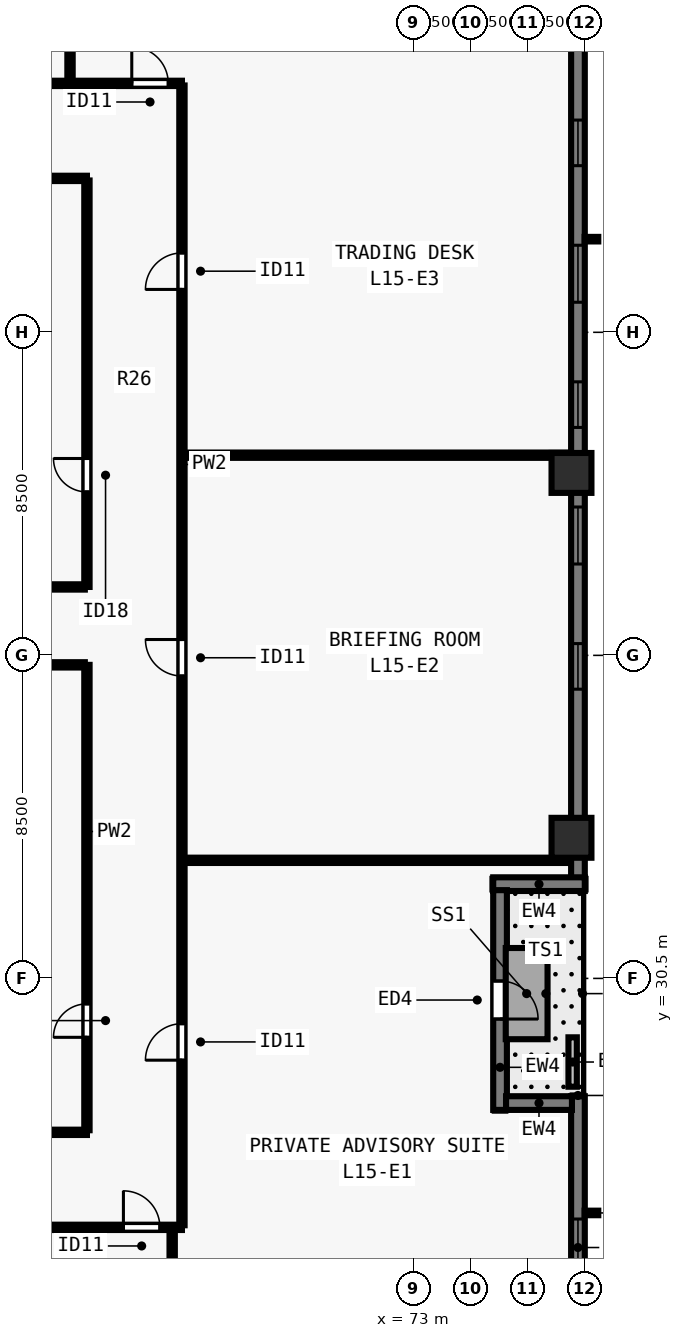
"""IFC4 building model, lengths in metres.
Left out: names, types, materials, properties, quantities, classifications, styles, units other than length and angle.
Written with IfcOpenShell. Run it as: python <this file> out.ifc"""

import sys

from ifc_helpers import new_model, si_unit, direction, frame, frame_2d, origin, origin_2d, place, context, subcontext, project, spatial, rectangle, extrude, element, fill, save


model = new_model("IFC4")
c1 = context("Model", 3, precision=1e-05, world=origin(), true_north=direction((0.0, 1.0)))
c2 = subcontext(c1, "Body", "Model", "MODEL_VIEW")
j1 = project(units=[si_unit("LENGTHUNIT", "METRE"), si_unit("PLANEANGLEUNIT", "RADIAN")], contexts=[c1])
p1 = place(None, origin())
s1 = spatial("IfcSite", under=j1, at=p1, CompositionType="ELEMENT")
p2 = place(p1, origin())
s2 = spatial("IfcBuilding", under=s1, at=p2, CompositionType="ELEMENT")
p3 = place(p2, frame((0.0, 0.0, 58.5)))
s3 = spatial("IfcBuildingStorey", under=s2, at=p3, CompositionType="ELEMENT", Elevation=58.5)
for number, where, z_axis, x_axis in (
    (1, (77.15, 34.2, 0.0), (0.0, 0.0, 1.0), (0.0, 1.0, 0.0)),
    (2, (77.15, 43.8, 0.0), (0.0, 0.0, 1.0), (0.0, 1.0, 0.0)),
):
    element("IfcColumn", number, at=place(p3, frame(where, z_axis=z_axis, x_axis=x_axis)), inside=s3, PredefinedType="COLUMN", context=c2, shape_type="SweptSolid", body=[
        extrude(rectangle(XDim=1.05, YDim=1.05, at=origin_2d()), origin(), (0.0, 0.0, 1.0), 3.5),
    ])
p4 = place(p3, frame((77.32, 27.4, 0.0), z_axis=(0.0, 0.0, 1.0), x_axis=(0.0, -1.0, 0.0)))
e3 = element("IfcWall", 3, at=p4, inside=s3, PredefinedType="SOLIDWALL", context=c2, shape_type="SweptSolid", body=[
    extrude(rectangle(XDim=10.562, YDim=0.36, at=frame_2d((5.281, 0.0))), origin(), (0.0, 0.0, 1.0), 3.28),
])
p5 = place(p4, frame((3.231, 0.0, 0.8)))
e4 = element("IfcOpeningElement", 4, at=p5, cuts=e3, PredefinedType="OPENING", context=c2, shape_type="SweptSolid", body=[
    extrude(rectangle(XDim=1.5, YDim=1.544, at=frame_2d((0.75, 0.772))), frame((0.0, 0.19, 0.0), z_axis=(0.0, -1.0, 0.0), x_axis=(1.0, 0.0, 0.0)), (0.0, 0.0, 1.0), 0.38),
])
p6 = place(p3, frame((77.32, 61.5, 0.0), z_axis=(0.0, 0.0, 1.0), x_axis=(0.0, -1.0, 0.0)))
e5 = element("IfcWall", 5, at=p6, inside=s3, PredefinedType="SOLIDWALL", context=c2, shape_type="SweptSolid", body=[
    extrude(rectangle(XDim=28.362, YDim=0.36, at=frame_2d((14.181, 0.0))), origin(), (0.0, 0.0, 1.0), 3.28),
])
p7 = place(p6, frame((4.822, 0.0, 0.8)))
e6 = element("IfcOpeningElement", 6, at=p7, cuts=e5, PredefinedType="OPENING", context=c2, shape_type="SweptSolid", body=[
    extrude(rectangle(XDim=1.5, YDim=1.544, at=frame_2d((0.75, 0.772))), frame((0.0, 0.19, 0.0), z_axis=(0.0, -1.0, 0.0), x_axis=(1.0, 0.0, 0.0)), (0.0, 0.0, 1.0), 0.38),
])
p8 = place(p6, frame((8.416, 0.0, 0.8)))
e7 = element("IfcOpeningElement", 7, at=p8, cuts=e5, PredefinedType="OPENING", context=c2, shape_type="SweptSolid", body=[
    extrude(rectangle(XDim=1.2, YDim=1.544, at=frame_2d((0.6, 0.772))), frame((0.0, 0.19, 0.0), z_axis=(0.0, -1.0, 0.0), x_axis=(1.0, 0.0, 0.0)), (0.0, 0.0, 1.0), 0.38),
])
p9 = place(p6, frame((11.709, 0.0, 0.8)))
e8 = element("IfcOpeningElement", 8, at=p9, cuts=e5, PredefinedType="OPENING", context=c2, shape_type="SweptSolid", body=[
    extrude(rectangle(XDim=1.5, YDim=1.544, at=frame_2d((0.75, 0.772))), frame((0.0, 0.19, 0.0), z_axis=(0.0, -1.0, 0.0), x_axis=(1.0, 0.0, 0.0)), (0.0, 0.0, 1.0), 0.38),
])
p10 = place(p6, frame((15.303, 0.0, 0.8)))
e9 = element("IfcOpeningElement", 9, at=p10, cuts=e5, PredefinedType="OPENING", context=c2, shape_type="SweptSolid", body=[
    extrude(rectangle(XDim=1.2, YDim=1.544, at=frame_2d((0.6, 0.772))), frame((0.0, 0.19, 0.0), z_axis=(0.0, -1.0, 0.0), x_axis=(1.0, 0.0, 0.0)), (0.0, 0.0, 1.0), 0.38),
])
p11 = place(p6, frame((18.596, 0.0, 0.8)))
e10 = element("IfcOpeningElement", 10, at=p11, cuts=e5, PredefinedType="OPENING", context=c2, shape_type="SweptSolid", body=[
    extrude(rectangle(XDim=1.5, YDim=1.544, at=frame_2d((0.75, 0.772))), frame((0.0, 0.19, 0.0), z_axis=(0.0, -1.0, 0.0), x_axis=(1.0, 0.0, 0.0)), (0.0, 0.0, 1.0), 0.38),
])
p12 = place(p6, frame((22.19, 0.0, 0.8)))
e11 = element("IfcOpeningElement", 11, at=p12, cuts=e5, PredefinedType="OPENING", context=c2, shape_type="SweptSolid", body=[
    extrude(rectangle(XDim=1.2, YDim=1.544, at=frame_2d((0.6, 0.772))), frame((0.0, 0.19, 0.0), z_axis=(0.0, -1.0, 0.0), x_axis=(1.0, 0.0, 0.0)), (0.0, 0.0, 1.0), 0.38),
])
p13 = place(p3, frame((77.5, 32.98, 0.0), z_axis=(0.0, 0.0, 1.0), x_axis=(-1.0, 0.0, 0.0)))
e12 = element("IfcWall", 12, at=p13, inside=s3, PredefinedType="SOLIDWALL", context=c2, shape_type="SweptSolid", body=[
    extrude(rectangle(XDim=2.41, YDim=0.36, at=frame_2d((1.205, 0.0))), origin(), (0.0, 0.0, 1.0), 3.28),
])
p14 = place(p3, frame((75.27, 32.822, 0.0), z_axis=(0.0, 0.0, 1.0), x_axis=(0.0, -1.0, 0.0)))
e13 = element("IfcWall", 13, at=p14, inside=s3, PredefinedType="SOLIDWALL", context=c2, shape_type="SweptSolid", body=[
    extrude(rectangle(XDim=5.782, YDim=0.36, at=frame_2d((2.891, 0.0))), origin(), (0.0, 0.0, 1.0), 3.28),
])
p15 = place(p14, frame((2.391, 0.0, 0.0)))
e14 = element("IfcOpeningElement", 14, at=p15, cuts=e13, PredefinedType="OPENING", context=c2, shape_type="SweptSolid", body=[
    extrude(rectangle(XDim=1.0, YDim=2.15, at=frame_2d((0.5, 1.075))), frame((0.0, 0.19, 0.0), z_axis=(0.0, -1.0, 0.0), x_axis=(1.0, 0.0, 0.0)), (0.0, 0.0, 1.0), 0.38),
])
p16 = place(p3, frame((75.428, 27.22, 0.0), z_axis=(0.0, 0.0, 1.0), x_axis=(1.0, 0.0, 0.0)))
e15 = element("IfcWall", 15, at=p16, inside=s3, PredefinedType="SOLIDWALL", context=c2, shape_type="SweptSolid", body=[
    extrude(rectangle(XDim=1.734, YDim=0.36, at=frame_2d((0.867, 0.0))), origin(), (0.0, 0.0, 1.0), 3.28),
])
p17 = place(p3, frame((77.18, 27.65, 0.0), z_axis=(0.0, 0.0, 1.0), x_axis=(0.0, 1.0, 0.0)))
e16 = element("IfcWall", 16, at=p17, inside=s3, PredefinedType="PARAPET", context=c2, shape_type="SweptSolid", body=[
    extrude(rectangle(XDim=1.3, YDim=0.22, at=frame_2d((0.65, 0.0))), origin(), (0.0, 0.0, 1.0), 0.55),
])
p18 = place(p3, frame((37.1, 23.95, 0.0), z_axis=(0.0, 0.0, 1.0), x_axis=(1.0, 0.0, 0.0)))
e17 = element("IfcWall", 17, at=p18, inside=s3, PredefinedType="PARTITIONING", context=c2, shape_type="SweptSolid", body=[
    extrude(rectangle(XDim=29.8, YDim=0.14, at=frame_2d((14.9, 0.0))), origin(), (0.0, 0.0, 1.0), 3.28),
])
p19 = place(p18, frame((4.191, 0.0, 0.0)))
e18 = element("IfcOpeningElement", 18, at=p19, cuts=e17, PredefinedType="OPENING", context=c2, shape_type="SweptSolid", body=[
    extrude(rectangle(XDim=0.96, YDim=2.12, at=frame_2d((0.48, 1.06))), frame((0.0, 0.08, 0.0), z_axis=(0.0, -1.0, 0.0), x_axis=(1.0, 0.0, 0.0)), (0.0, 0.0, 1.0), 0.16),
])
p20 = place(p18, frame((5.358, 0.0, 0.0)))
e19 = element("IfcOpeningElement", 19, at=p20, cuts=e17, PredefinedType="OPENING", context=c2, shape_type="SweptSolid", body=[
    extrude(rectangle(XDim=0.96, YDim=2.12, at=frame_2d((0.48, 1.06))), frame((0.0, 0.08, 0.0), z_axis=(0.0, -1.0, 0.0), x_axis=(1.0, 0.0, 0.0)), (0.0, 0.0, 1.0), 0.16),
])
p21 = place(p18, frame((14.51, 0.0, 0.0)))
e20 = element("IfcOpeningElement", 20, at=p21, cuts=e17, PredefinedType="OPENING", context=c2, shape_type="SweptSolid", body=[
    extrude(rectangle(XDim=0.96, YDim=2.12, at=frame_2d((0.48, 1.06))), frame((0.0, 0.08, 0.0), z_axis=(0.0, -1.0, 0.0), x_axis=(1.0, 0.0, 0.0)), (0.0, 0.0, 1.0), 0.16),
])
p22 = place(p18, frame((24.542, 0.0, 0.0)))
e21 = element("IfcOpeningElement", 21, at=p22, cuts=e17, PredefinedType="OPENING", context=c2, shape_type="SweptSolid", body=[
    extrude(rectangle(XDim=0.96, YDim=2.12, at=frame_2d((0.48, 1.06))), frame((0.0, 0.08, 0.0), z_axis=(0.0, -1.0, 0.0), x_axis=(1.0, 0.0, 0.0)), (0.0, 0.0, 1.0), 0.16),
])
p23 = place(p18, frame((28.26, 0.0, 0.0)))
e22 = element("IfcOpeningElement", 22, at=p23, cuts=e17, PredefinedType="OPENING", context=c2, shape_type="SweptSolid", body=[
    extrude(rectangle(XDim=0.96, YDim=2.12, at=frame_2d((0.48, 1.06))), frame((0.0, 0.08, 0.0), z_axis=(0.0, -1.0, 0.0), x_axis=(1.0, 0.0, 0.0)), (0.0, 0.0, 1.0), 0.16),
])
p24 = place(p3, frame((37.1, 54.05, 0.0), z_axis=(0.0, 0.0, 1.0), x_axis=(1.0, 0.0, 0.0)))
e23 = element("IfcWall", 23, at=p24, inside=s3, PredefinedType="PARTITIONING", context=c2, shape_type="SweptSolid", body=[
    extrude(rectangle(XDim=29.8, YDim=0.14, at=frame_2d((14.9, 0.0))), origin(), (0.0, 0.0, 1.0), 3.28),
])
p25 = place(p24, frame((3.522, 0.0, 0.0)))
e24 = element("IfcOpeningElement", 24, at=p25, cuts=e23, PredefinedType="OPENING", context=c2, shape_type="SweptSolid", body=[
    extrude(rectangle(XDim=0.96, YDim=2.12, at=frame_2d((0.48, 1.06))), frame((0.0, 0.08, 0.0), z_axis=(0.0, -1.0, 0.0), x_axis=(1.0, 0.0, 0.0)), (0.0, 0.0, 1.0), 0.16),
])
p26 = place(p24, frame((8.06, 0.0, 0.0)))
e25 = element("IfcOpeningElement", 25, at=p26, cuts=e23, PredefinedType="OPENING", context=c2, shape_type="SweptSolid", body=[
    extrude(rectangle(XDim=0.96, YDim=2.12, at=frame_2d((0.48, 1.06))), frame((0.0, 0.08, 0.0), z_axis=(0.0, -1.0, 0.0), x_axis=(1.0, 0.0, 0.0)), (0.0, 0.0, 1.0), 0.16),
])
p27 = place(p24, frame((20.6, 0.0, 0.0)))
e26 = element("IfcOpeningElement", 26, at=p27, cuts=e23, PredefinedType="OPENING", context=c2, shape_type="SweptSolid", body=[
    extrude(rectangle(XDim=0.96, YDim=2.12, at=frame_2d((0.48, 1.06))), frame((0.0, 0.08, 0.0), z_axis=(0.0, -1.0, 0.0), x_axis=(1.0, 0.0, 0.0)), (0.0, 0.0, 1.0), 0.16),
])
p28 = place(p24, frame((28.48, 0.0, 0.0)))
e27 = element("IfcOpeningElement", 27, at=p28, cuts=e23, PredefinedType="OPENING", context=c2, shape_type="SweptSolid", body=[
    extrude(rectangle(XDim=0.96, YDim=2.12, at=frame_2d((0.48, 1.06))), frame((0.0, 0.08, 0.0), z_axis=(0.0, -1.0, 0.0), x_axis=(1.0, 0.0, 0.0)), (0.0, 0.0, 1.0), 0.16),
])
p29 = place(p3, frame((66.9, 24.005, 0.0), z_axis=(0.0, 0.0, 1.0), x_axis=(0.0, 1.0, 0.0)))
e28 = element("IfcWall", 28, at=p29, inside=s3, PredefinedType="PARTITIONING", context=c2, shape_type="SweptSolid", body=[
    extrude(rectangle(XDim=29.99, YDim=0.14, at=frame_2d((14.995, 0.0))), origin(), (0.0, 0.0, 1.0), 3.28),
])
p30 = place(p29, frame((4.344, 0.0, 0.0)))
e29 = element("IfcOpeningElement", 29, at=p30, cuts=e28, PredefinedType="OPENING", context=c2, shape_type="SweptSolid", body=[
    extrude(rectangle(XDim=0.96, YDim=2.12, at=frame_2d((0.48, 1.06))), frame((0.0, 0.08, 0.0), z_axis=(0.0, -1.0, 0.0), x_axis=(1.0, 0.0, 0.0)), (0.0, 0.0, 1.0), 0.16),
])
p31 = place(p29, frame((14.452, 0.0, 0.0)))
e30 = element("IfcOpeningElement", 30, at=p31, cuts=e28, PredefinedType="OPENING", context=c2, shape_type="SweptSolid", body=[
    extrude(rectangle(XDim=0.96, YDim=2.12, at=frame_2d((0.48, 1.06))), frame((0.0, 0.08, 0.0), z_axis=(0.0, -1.0, 0.0), x_axis=(1.0, 0.0, 0.0)), (0.0, 0.0, 1.0), 0.16),
])
p32 = place(p29, frame((24.623, 0.0, 0.0)))
e31 = element("IfcOpeningElement", 31, at=p32, cuts=e28, PredefinedType="OPENING", context=c2, shape_type="SweptSolid", body=[
    extrude(rectangle(XDim=0.96, YDim=2.12, at=frame_2d((0.48, 1.06))), frame((0.0, 0.08, 0.0), z_axis=(0.0, -1.0, 0.0), x_axis=(1.0, 0.0, 0.0)), (0.0, 0.0, 1.0), 0.16),
])
p33 = place(p3, frame((39.6, 26.45, 0.0), z_axis=(0.0, 0.0, 1.0), x_axis=(1.0, 0.0, 0.0)))
e32 = element("IfcWall", 32, at=p33, inside=s3, PredefinedType="PARTITIONING", context=c2, shape_type="SweptSolid", body=[
    extrude(rectangle(XDim=24.8, YDim=0.14, at=frame_2d((12.4, 0.0))), origin(), (0.0, 0.0, 1.0), 3.28),
])
p34 = place(p33, frame((2.2, 0.0, 0.0)))
e33 = element("IfcOpeningElement", 33, at=p34, cuts=e32, PredefinedType="OPENING", context=c2, shape_type="SweptSolid", body=[
    extrude(rectangle(XDim=0.96, YDim=2.12, at=frame_2d((0.48, 1.06))), frame((0.0, 0.08, 0.0), z_axis=(0.0, -1.0, 0.0), x_axis=(1.0, 0.0, 0.0)), (0.0, 0.0, 1.0), 0.16),
])
p35 = place(p33, frame((14.4, 0.0, 0.0)))
e34 = element("IfcOpeningElement", 34, at=p35, cuts=e32, PredefinedType="OPENING", context=c2, shape_type="SweptSolid", body=[
    extrude(rectangle(XDim=0.96, YDim=2.12, at=frame_2d((0.48, 1.06))), frame((0.0, 0.08, 0.0), z_axis=(0.0, -1.0, 0.0), x_axis=(1.0, 0.0, 0.0)), (0.0, 0.0, 1.0), 0.16),
])
p36 = place(p3, frame((39.6, 51.55, 0.0), z_axis=(0.0, 0.0, 1.0), x_axis=(1.0, 0.0, 0.0)))
e35 = element("IfcWall", 35, at=p36, inside=s3, PredefinedType="PARTITIONING", context=c2, shape_type="SweptSolid", body=[
    extrude(rectangle(XDim=24.8, YDim=0.14, at=frame_2d((12.4, 0.0))), origin(), (0.0, 0.0, 1.0), 3.28),
])
p37 = place(p36, frame((3.2, 0.0, 0.0)))
e36 = element("IfcOpeningElement", 36, at=p37, cuts=e35, PredefinedType="OPENING", context=c2, shape_type="SweptSolid", body=[
    extrude(rectangle(XDim=0.96, YDim=2.12, at=frame_2d((0.48, 1.06))), frame((0.0, 0.08, 0.0), z_axis=(0.0, -1.0, 0.0), x_axis=(1.0, 0.0, 0.0)), (0.0, 0.0, 1.0), 0.16),
])
p38 = place(p36, frame((18.4, 0.0, 0.0)))
e37 = element("IfcOpeningElement", 37, at=p38, cuts=e35, PredefinedType="OPENING", context=c2, shape_type="SweptSolid", body=[
    extrude(rectangle(XDim=0.96, YDim=2.12, at=frame_2d((0.48, 1.06))), frame((0.0, 0.08, 0.0), z_axis=(0.0, -1.0, 0.0), x_axis=(1.0, 0.0, 0.0)), (0.0, 0.0, 1.0), 0.16),
])
p39 = place(p3, frame((64.4, 26.505, 0.0), z_axis=(0.0, 0.0, 1.0), x_axis=(0.0, 1.0, 0.0)))
e38 = element("IfcWall", 38, at=p39, inside=s3, PredefinedType="PARTITIONING", context=c2, shape_type="SweptSolid", body=[
    extrude(rectangle(XDim=12.245, YDim=0.14, at=frame_2d((6.123, 0.0))), origin(), (0.0, 0.0, 1.0), 3.28),
])
p40 = place(p39, frame((2.445, 0.0, 0.0)))
e39 = element("IfcOpeningElement", 39, at=p40, cuts=e38, PredefinedType="OPENING", context=c2, shape_type="SweptSolid", body=[
    extrude(rectangle(XDim=0.88, YDim=2.1, at=frame_2d((0.44, 1.05))), frame((0.0, 0.08, 0.0), z_axis=(0.0, -1.0, 0.0), x_axis=(1.0, 0.0, 0.0)), (0.0, 0.0, 1.0), 0.16),
])
p41 = place(p3, frame((64.4, 40.8, 0.0), z_axis=(0.0, 0.0, 1.0), x_axis=(0.0, 1.0, 0.0)))
e40 = element("IfcWall", 40, at=p41, inside=s3, PredefinedType="PARTITIONING", context=c2, shape_type="SweptSolid", body=[
    extrude(rectangle(XDim=10.695, YDim=0.14, at=frame_2d((5.348, 0.0))), origin(), (0.0, 0.0, 1.0), 3.28),
])
p42 = place(p41, frame((2.5, 0.0, 0.0)))
e41 = element("IfcOpeningElement", 41, at=p42, cuts=e40, PredefinedType="OPENING", context=c2, shape_type="SweptSolid", body=[
    extrude(rectangle(XDim=0.88, YDim=2.1, at=frame_2d((0.44, 1.05))), frame((0.0, 0.08, 0.0), z_axis=(0.0, -1.0, 0.0), x_axis=(1.0, 0.0, 0.0)), (0.0, 0.0, 1.0), 0.16),
])
for number, where, z_axis, x_axis in (
    (42, (60.76, 38.75, 0.0), (0.0, 0.0, 1.0), (1.0, 0.0, 0.0)),
    (43, (60.76, 40.8, 0.0), (0.0, 0.0, 1.0), (1.0, 0.0, 0.0)),
):
    element("IfcWall", number, at=place(p3, frame(where, z_axis=z_axis, x_axis=x_axis)), inside=s3, PredefinedType="PARTITIONING", context=c2, shape_type="SweptSolid", body=[
        extrude(rectangle(XDim=3.585, YDim=0.14, at=frame_2d((1.792, 0.0))), origin(), (0.0, 0.0, 1.0), 3.28),
    ])
p43 = place(p3, frame((66.643, 13.92, 0.0), z_axis=(0.0, 0.0, 1.0), x_axis=(0.0, 1.0, 0.0)))
e44 = element("IfcWall", 44, at=p43, inside=s3, PredefinedType="PARTITIONING", context=c2, shape_type="SweptSolid", body=[
    extrude(rectangle(XDim=9.93, YDim=0.14, at=frame_2d((4.965, 0.0))), origin(), (0.0, 0.0, 1.0), 2.439),
])
p44 = place(p3, frame((63.955, 54.15, 0.0), z_axis=(0.0, 0.0, 1.0), x_axis=(0.0, 1.0, 0.0)))
e45 = element("IfcWall", 45, at=p44, inside=s3, PredefinedType="PARTITIONING", context=c2, shape_type="SweptSolid", body=[
    extrude(rectangle(XDim=9.93, YDim=0.14, at=frame_2d((4.965, 0.0))), origin(), (0.0, 0.0, 1.0), 3.28),
])
for number, where, z_axis, x_axis in (
    (46, (67.0, 33.607, 0.0), (0.0, 0.0, 1.0), (1.0, 0.0, 0.0)),
    (47, (67.0, 44.267, 0.0), (0.0, 0.0, 1.0), (1.0, 0.0, 0.0)),
):
    element("IfcWall", number, at=place(p3, frame(where, z_axis=z_axis, x_axis=x_axis)), inside=s3, PredefinedType="PARTITIONING", context=c2, shape_type="SweptSolid", body=[
        extrude(rectangle(XDim=10.08, YDim=0.14, at=frame_2d((5.04, 0.0))), origin(), (0.0, 0.0, 1.0), 2.439),
    ])
p45 = place(p5, origin())
e48 = element("IfcWindow", 48, at=p45, inside=s3, PartitioningType="SINGLE_PANEL", PredefinedType="WINDOW", context=c2, shape_type="SweptSolid", body=[
    extrude(rectangle(XDim=1.5, YDim=1.544, at=frame_2d((0.75, 0.772))), frame((0.0, -0.05, 0.0), z_axis=(0.0, -1.0, 0.0), x_axis=(1.0, 0.0, 0.0)), (0.0, 0.0, 1.0), 0.06),
])
fill(e4, e48)
p46 = place(p8, origin())
e49 = element("IfcWindow", 49, at=p46, inside=s3, PartitioningType="SINGLE_PANEL", PredefinedType="WINDOW", context=c2, shape_type="SweptSolid", body=[
    extrude(rectangle(XDim=1.2, YDim=1.544, at=frame_2d((0.6, 0.772))), frame((0.0, -0.05, 0.0), z_axis=(0.0, -1.0, 0.0), x_axis=(1.0, 0.0, 0.0)), (0.0, 0.0, 1.0), 0.06),
])
fill(e7, e49)
p47 = place(p9, origin())
e50 = element("IfcWindow", 50, at=p47, inside=s3, PartitioningType="SINGLE_PANEL", PredefinedType="WINDOW", context=c2, shape_type="SweptSolid", body=[
    extrude(rectangle(XDim=1.5, YDim=1.544, at=frame_2d((0.75, 0.772))), frame((0.0, -0.05, 0.0), z_axis=(0.0, -1.0, 0.0), x_axis=(1.0, 0.0, 0.0)), (0.0, 0.0, 1.0), 0.06),
])
fill(e8, e50)
p48 = place(p10, origin())
e51 = element("IfcWindow", 51, at=p48, inside=s3, PartitioningType="SINGLE_PANEL", PredefinedType="WINDOW", context=c2, shape_type="SweptSolid", body=[
    extrude(rectangle(XDim=1.2, YDim=1.544, at=frame_2d((0.6, 0.772))), frame((0.0, -0.05, 0.0), z_axis=(0.0, -1.0, 0.0), x_axis=(1.0, 0.0, 0.0)), (0.0, 0.0, 1.0), 0.06),
])
fill(e9, e51)
p49 = place(p11, origin())
e52 = element("IfcWindow", 52, at=p49, inside=s3, PartitioningType="SINGLE_PANEL", PredefinedType="WINDOW", context=c2, shape_type="SweptSolid", body=[
    extrude(rectangle(XDim=1.5, YDim=1.544, at=frame_2d((0.75, 0.772))), frame((0.0, -0.05, 0.0), z_axis=(0.0, -1.0, 0.0), x_axis=(1.0, 0.0, 0.0)), (0.0, 0.0, 1.0), 0.06),
])
fill(e10, e52)
p50 = place(p12, origin())
e53 = element("IfcWindow", 53, at=p50, inside=s3, PartitioningType="SINGLE_PANEL", PredefinedType="WINDOW", context=c2, shape_type="SweptSolid", body=[
    extrude(rectangle(XDim=1.2, YDim=1.544, at=frame_2d((0.6, 0.772))), frame((0.0, -0.05, 0.0), z_axis=(0.0, -1.0, 0.0), x_axis=(1.0, 0.0, 0.0)), (0.0, 0.0, 1.0), 0.06),
])
fill(e11, e53)
p51 = place(p15, origin())
e54 = element("IfcDoor", 54, at=p51, inside=s3, OperationType="SINGLE_SWING_RIGHT", PredefinedType="DOOR", context=c2, shape_type="SweptSolid", body=[
    extrude(rectangle(XDim=1.0, YDim=2.15, at=frame_2d((0.5, 1.075))), frame((0.0, 0.025, 0.0), z_axis=(0.0, -1.0, 0.0), x_axis=(1.0, 0.0, 0.0)), (0.0, 0.0, 1.0), 0.05),
])
fill(e14, e54)
p52 = place(p40, origin())
e55 = element("IfcDoor", 55, at=p52, inside=s3, OperationType="SINGLE_SWING_LEFT", PredefinedType="DOOR", context=c2, shape_type="SweptSolid", body=[
    extrude(rectangle(XDim=0.88, YDim=2.1, at=frame_2d((0.44, 1.05))), frame((0.0, 0.025, 0.0), z_axis=(0.0, -1.0, 0.0), x_axis=(1.0, 0.0, 0.0)), (0.0, 0.0, 1.0), 0.05),
])
fill(e39, e55)
p53 = place(p42, origin())
e56 = element("IfcDoor", 56, at=p53, inside=s3, OperationType="SINGLE_SWING_RIGHT", PredefinedType="DOOR", context=c2, shape_type="SweptSolid", body=[
    extrude(rectangle(XDim=0.88, YDim=2.1, at=frame_2d((0.44, 1.05))), frame((0.0, 0.025, 0.0), z_axis=(0.0, -1.0, 0.0), x_axis=(1.0, 0.0, 0.0)), (0.0, 0.0, 1.0), 0.05),
])
fill(e41, e56)
p54 = place(p23, origin())
e57 = element("IfcDoor", 57, at=p54, inside=s3, OperationType="SINGLE_SWING_LEFT", PredefinedType="DOOR", context=c2, shape_type="SweptSolid", body=[
    extrude(rectangle(XDim=0.96, YDim=2.12, at=frame_2d((0.48, 1.06))), frame((0.0, 0.025, 0.0), z_axis=(0.0, -1.0, 0.0), x_axis=(1.0, 0.0, 0.0)), (0.0, 0.0, 1.0), 0.05),
])
fill(e22, e57)
p55 = place(p28, origin())
e58 = element("IfcDoor", 58, at=p55, inside=s3, OperationType="SINGLE_SWING_LEFT", PredefinedType="DOOR", context=c2, shape_type="SweptSolid", body=[
    extrude(rectangle(XDim=0.96, YDim=2.12, at=frame_2d((0.48, 1.06))), frame((0.0, 0.025, 0.0), z_axis=(0.0, -1.0, 0.0), x_axis=(1.0, 0.0, 0.0)), (0.0, 0.0, 1.0), 0.05),
])
fill(e27, e58)
p56 = place(p30, origin())
e59 = element("IfcDoor", 59, at=p56, inside=s3, OperationType="SINGLE_SWING_LEFT", PredefinedType="DOOR", context=c2, shape_type="SweptSolid", body=[
    extrude(rectangle(XDim=0.96, YDim=2.12, at=frame_2d((0.48, 1.06))), frame((0.0, 0.025, 0.0), z_axis=(0.0, -1.0, 0.0), x_axis=(1.0, 0.0, 0.0)), (0.0, 0.0, 1.0), 0.05),
])
fill(e29, e59)
p57 = place(p31, origin())
e60 = element("IfcDoor", 60, at=p57, inside=s3, OperationType="SINGLE_SWING_RIGHT", PredefinedType="DOOR", context=c2, shape_type="SweptSolid", body=[
    extrude(rectangle(XDim=0.96, YDim=2.12, at=frame_2d((0.48, 1.06))), frame((0.0, 0.025, 0.0), z_axis=(0.0, -1.0, 0.0), x_axis=(1.0, 0.0, 0.0)), (0.0, 0.0, 1.0), 0.05),
])
fill(e30, e60)
p58 = place(p32, origin())
e61 = element("IfcDoor", 61, at=p58, inside=s3, OperationType="SINGLE_SWING_LEFT", PredefinedType="DOOR", context=c2, shape_type="SweptSolid", body=[
    extrude(rectangle(XDim=0.96, YDim=2.12, at=frame_2d((0.48, 1.06))), frame((0.0, 0.025, 0.0), z_axis=(0.0, -1.0, 0.0), x_axis=(1.0, 0.0, 0.0)), (0.0, 0.0, 1.0), 0.05),
])
fill(e31, e61)
save(model, sys.argv[1])
